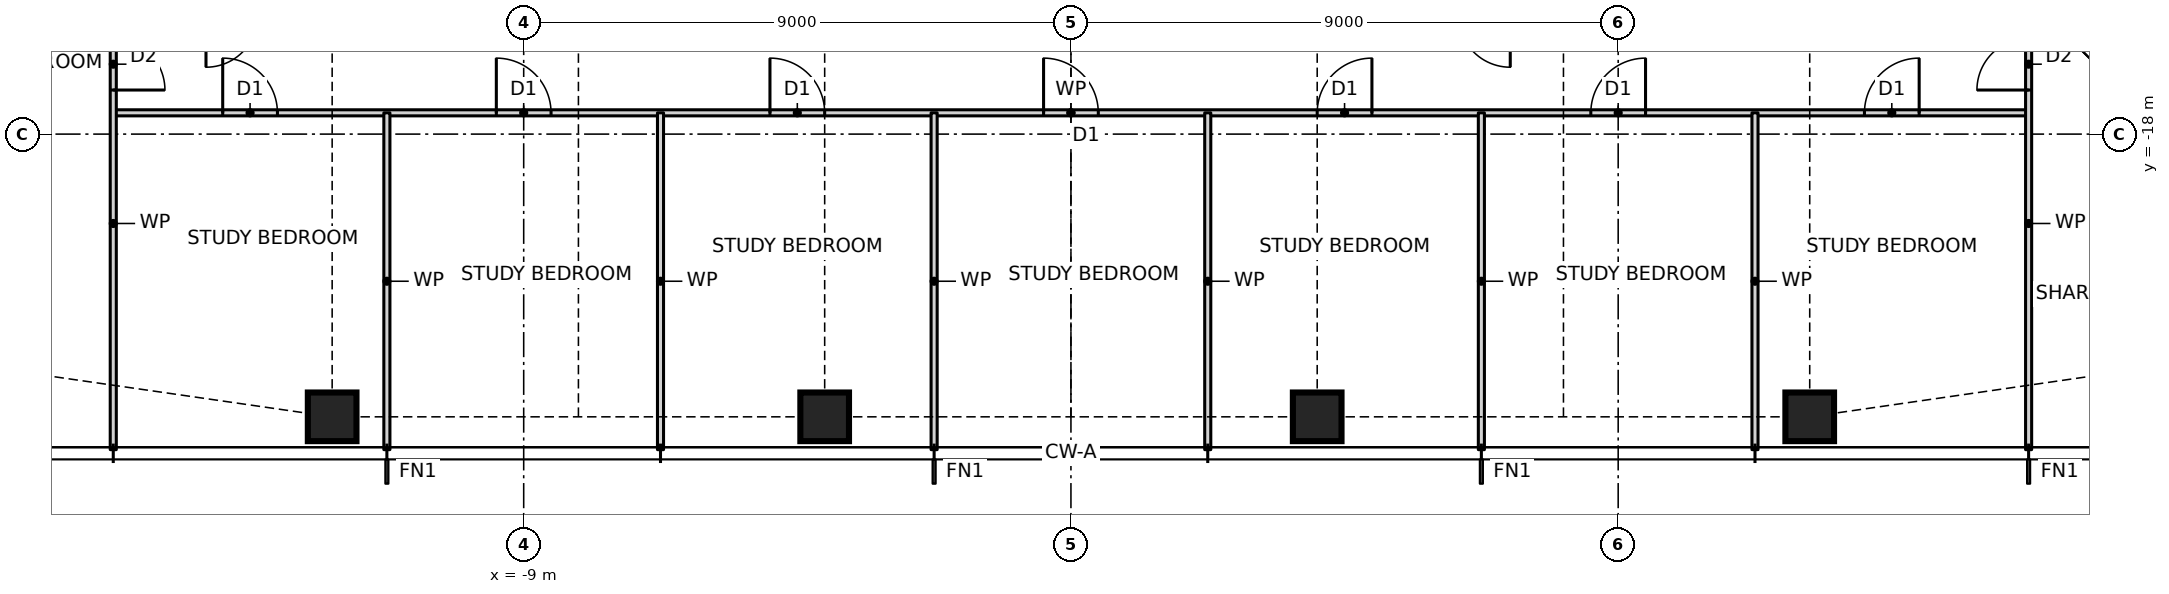
"""IFC4 building model, lengths in metres.
Left out: names, types, materials, properties, quantities, classifications, styles, units other than length and angle.
Written with IfcOpenShell. Run it as: python <this file> out.ifc"""

import sys

from ifc_helpers import new_model, si_unit, direction, frame, frame_2d, origin, origin_2d, place, context, subcontext, project, spatial, rectangle, hollow_rectangle, extrude, element, fill, save


model = new_model("IFC4")
c1 = context("Model", 3, precision=1e-05, world=origin(), true_north=direction((0.0, 1.0)))
c2 = subcontext(c1, "Body", "Model", "MODEL_VIEW")
j1 = project(units=[si_unit("LENGTHUNIT", "METRE"), si_unit("PLANEANGLEUNIT", "RADIAN")], contexts=[c1])
p1 = place(None, origin())
s1 = spatial("IfcSite", under=j1, at=p1, CompositionType="ELEMENT")
p2 = place(p1, origin())
s2 = spatial("IfcBuilding", under=s1, at=p2, CompositionType="ELEMENT")
p3 = place(p2, frame((0.0, 0.0, 18.5)))
s3 = spatial("IfcBuildingStorey", under=s2, at=p3, CompositionType="ELEMENT", Elevation=18.5)
for number, where, z_axis, x_axis in (
    (1, (-12.15, -22.65, 0.0), (0.0, 0.0, 1.0), (1.0, 0.0, 0.0)),
    (2, (-4.05, -22.65, 0.0), (0.0, 0.0, 1.0), (1.0, 0.0, 0.0)),
    (3, (4.05, -22.65, 0.0), (0.0, 0.0, 1.0), (1.0, 0.0, 0.0)),
    (4, (12.15, -22.65, 0.0), (0.0, 0.0, 1.0), (1.0, 0.0, 0.0)),
):
    element("IfcColumn", number, at=place(p3, frame(where, z_axis=z_axis, x_axis=x_axis)), inside=s3, PredefinedType="COLUMN", context=c2, shape_type="SweptSolid", body=[
        extrude(hollow_rectangle(XDim=0.8, YDim=0.8, WallThickness=0.09, at=origin_2d()), origin(), (0.0, 0.0, 1.0), 3.5),
    ])
p4 = place(p3, frame((-15.75, -17.65, 0.0), z_axis=(0.0, 0.0, 1.0), x_axis=(1.0, 0.0, 0.0)))
e5 = element("IfcWall", 5, at=p4, inside=s3, PredefinedType="PARTITIONING", context=c2, shape_type="SweptSolid", body=[
    extrude(rectangle(XDim=31.5, YDim=0.1, at=frame_2d((15.75, 0.0))), origin(), (0.0, 0.0, 1.0), 3.27),
])
p5 = place(p4, frame((1.8, 0.0, 0.0)))
e6 = element("IfcOpeningElement", 6, at=p5, cuts=e5, PredefinedType="OPENING", context=c2, shape_type="SweptSolid", body=[
    extrude(rectangle(XDim=0.9, YDim=2.1, at=frame_2d((0.45, 1.05))), frame((0.0, 0.06, 0.0), z_axis=(0.0, -1.0, 0.0), x_axis=(1.0, 0.0, 0.0)), (0.0, 0.0, 1.0), 0.12),
])
p6 = place(p4, frame((6.3, 0.0, 0.0)))
e7 = element("IfcOpeningElement", 7, at=p6, cuts=e5, PredefinedType="OPENING", context=c2, shape_type="SweptSolid", body=[
    extrude(rectangle(XDim=0.9, YDim=2.1, at=frame_2d((0.45, 1.05))), frame((0.0, 0.06, 0.0), z_axis=(0.0, -1.0, 0.0), x_axis=(1.0, 0.0, 0.0)), (0.0, 0.0, 1.0), 0.12),
])
p7 = place(p4, frame((10.8, 0.0, 0.0)))
e8 = element("IfcOpeningElement", 8, at=p7, cuts=e5, PredefinedType="OPENING", context=c2, shape_type="SweptSolid", body=[
    extrude(rectangle(XDim=0.9, YDim=2.1, at=frame_2d((0.45, 1.05))), frame((0.0, 0.06, 0.0), z_axis=(0.0, -1.0, 0.0), x_axis=(1.0, 0.0, 0.0)), (0.0, 0.0, 1.0), 0.12),
])
p8 = place(p4, frame((15.3, 0.0, 0.0)))
e9 = element("IfcOpeningElement", 9, at=p8, cuts=e5, PredefinedType="OPENING", context=c2, shape_type="SweptSolid", body=[
    extrude(rectangle(XDim=0.9, YDim=2.1, at=frame_2d((0.45, 1.05))), frame((0.0, 0.06, 0.0), z_axis=(0.0, -1.0, 0.0), x_axis=(1.0, 0.0, 0.0)), (0.0, 0.0, 1.0), 0.12),
])
p9 = place(p4, frame((19.8, 0.0, 0.0)))
e10 = element("IfcOpeningElement", 10, at=p9, cuts=e5, PredefinedType="OPENING", context=c2, shape_type="SweptSolid", body=[
    extrude(rectangle(XDim=0.9, YDim=2.1, at=frame_2d((0.45, 1.05))), frame((0.0, 0.06, 0.0), z_axis=(0.0, -1.0, 0.0), x_axis=(1.0, 0.0, 0.0)), (0.0, 0.0, 1.0), 0.12),
])
p10 = place(p4, frame((24.3, 0.0, 0.0)))
e11 = element("IfcOpeningElement", 11, at=p10, cuts=e5, PredefinedType="OPENING", context=c2, shape_type="SweptSolid", body=[
    extrude(rectangle(XDim=0.9, YDim=2.1, at=frame_2d((0.45, 1.05))), frame((0.0, 0.06, 0.0), z_axis=(0.0, -1.0, 0.0), x_axis=(1.0, 0.0, 0.0)), (0.0, 0.0, 1.0), 0.12),
])
p11 = place(p4, frame((28.8, 0.0, 0.0)))
e12 = element("IfcOpeningElement", 12, at=p11, cuts=e5, PredefinedType="OPENING", context=c2, shape_type="SweptSolid", body=[
    extrude(rectangle(XDim=0.9, YDim=2.1, at=frame_2d((0.45, 1.05))), frame((0.0, 0.06, 0.0), z_axis=(0.0, -1.0, 0.0), x_axis=(1.0, 0.0, 0.0)), (0.0, 0.0, 1.0), 0.12),
])
p12 = place(p3, frame((15.75, -23.19, 0.0), z_axis=(0.0, 0.0, 1.0), x_axis=(0.0, 1.0, 0.0)))
e13 = element("IfcWall", 13, at=p12, inside=s3, PredefinedType="PARTITIONING", context=c2, shape_type="SweptSolid", body=[
    extrude(rectangle(XDim=7.44, YDim=0.1, at=frame_2d((3.72, 0.0))), origin(), (0.0, 0.0, 1.0), 3.27),
])
p13 = place(p12, frame((5.915, 0.0, 0.0)))
e14 = element("IfcOpeningElement", 14, at=p13, cuts=e13, PredefinedType="OPENING", context=c2, shape_type="SweptSolid", body=[
    extrude(rectangle(XDim=0.85, YDim=2.1, at=frame_2d((0.425, 1.05))), frame((0.0, 0.06, 0.0), z_axis=(0.0, -1.0, 0.0), x_axis=(1.0, 0.0, 0.0)), (0.0, 0.0, 1.0), 0.12),
])
for number, where, z_axis, x_axis in (
    (15, (11.25, -23.19, 0.0), (0.0, 0.0, 1.0), (0.0, 1.0, 0.0)),
    (16, (6.75, -23.19, 0.0), (0.0, 0.0, 1.0), (0.0, 1.0, 0.0)),
    (17, (2.25, -23.19, 0.0), (0.0, 0.0, 1.0), (0.0, 1.0, 0.0)),
    (18, (-2.25, -23.19, 0.0), (0.0, 0.0, 1.0), (0.0, 1.0, 0.0)),
    (19, (-6.75, -23.19, 0.0), (0.0, 0.0, 1.0), (0.0, 1.0, 0.0)),
    (20, (-11.25, -23.19, 0.0), (0.0, 0.0, 1.0), (0.0, 1.0, 0.0)),
):
    element("IfcWall", number, at=place(p3, frame(where, z_axis=z_axis, x_axis=x_axis)), inside=s3, PredefinedType="PARTITIONING", context=c2, shape_type="SweptSolid", body=[
        extrude(rectangle(XDim=5.54, YDim=0.1, at=frame_2d((2.77, 0.0))), origin(), (0.0, 0.0, 1.0), 3.27),
    ])
p14 = place(p3, frame((-15.75, -23.19, 0.0), z_axis=(0.0, 0.0, 1.0), x_axis=(0.0, 1.0, 0.0)))
e21 = element("IfcWall", 21, at=p14, inside=s3, PredefinedType="PARTITIONING", context=c2, shape_type="SweptSolid", body=[
    extrude(rectangle(XDim=7.44, YDim=0.1, at=frame_2d((3.72, 0.0))), origin(), (0.0, 0.0, 1.0), 3.27),
])
p15 = place(p14, frame((5.915, 0.0, 0.0)))
e22 = element("IfcOpeningElement", 22, at=p15, cuts=e21, PredefinedType="OPENING", context=c2, shape_type="SweptSolid", body=[
    extrude(rectangle(XDim=0.85, YDim=2.1, at=frame_2d((0.425, 1.05))), frame((0.0, 0.06, 0.0), z_axis=(0.0, -1.0, 0.0), x_axis=(1.0, 0.0, 0.0)), (0.0, 0.0, 1.0), 0.12),
])
p16 = place(p5, origin())
e23 = element("IfcDoor", 23, at=p16, inside=s3, OperationType="SINGLE_SWING_LEFT", PredefinedType="DOOR", context=c2, shape_type="SweptSolid", body=[
    extrude(rectangle(XDim=0.9, YDim=2.1, at=frame_2d((0.45, 1.05))), frame((0.0, 0.025, 0.0), z_axis=(0.0, -1.0, 0.0), x_axis=(1.0, 0.0, 0.0)), (0.0, 0.0, 1.0), 0.05),
])
fill(e6, e23)
p17 = place(p6, origin())
e24 = element("IfcDoor", 24, at=p17, inside=s3, OperationType="SINGLE_SWING_LEFT", PredefinedType="DOOR", context=c2, shape_type="SweptSolid", body=[
    extrude(rectangle(XDim=0.9, YDim=2.1, at=frame_2d((0.45, 1.05))), frame((0.0, 0.025, 0.0), z_axis=(0.0, -1.0, 0.0), x_axis=(1.0, 0.0, 0.0)), (0.0, 0.0, 1.0), 0.05),
])
fill(e7, e24)
p18 = place(p7, origin())
e25 = element("IfcDoor", 25, at=p18, inside=s3, OperationType="SINGLE_SWING_LEFT", PredefinedType="DOOR", context=c2, shape_type="SweptSolid", body=[
    extrude(rectangle(XDim=0.9, YDim=2.1, at=frame_2d((0.45, 1.05))), frame((0.0, 0.025, 0.0), z_axis=(0.0, -1.0, 0.0), x_axis=(1.0, 0.0, 0.0)), (0.0, 0.0, 1.0), 0.05),
])
fill(e8, e25)
p19 = place(p8, origin())
e26 = element("IfcDoor", 26, at=p19, inside=s3, OperationType="SINGLE_SWING_LEFT", PredefinedType="DOOR", context=c2, shape_type="SweptSolid", body=[
    extrude(rectangle(XDim=0.9, YDim=2.1, at=frame_2d((0.45, 1.05))), frame((0.0, 0.025, 0.0), z_axis=(0.0, -1.0, 0.0), x_axis=(1.0, 0.0, 0.0)), (0.0, 0.0, 1.0), 0.05),
])
fill(e9, e26)
p20 = place(p9, origin())
e27 = element("IfcDoor", 27, at=p20, inside=s3, OperationType="SINGLE_SWING_RIGHT", PredefinedType="DOOR", context=c2, shape_type="SweptSolid", body=[
    extrude(rectangle(XDim=0.9, YDim=2.1, at=frame_2d((0.45, 1.05))), frame((0.0, 0.025, 0.0), z_axis=(0.0, -1.0, 0.0), x_axis=(1.0, 0.0, 0.0)), (0.0, 0.0, 1.0), 0.05),
])
fill(e10, e27)
p21 = place(p10, origin())
e28 = element("IfcDoor", 28, at=p21, inside=s3, OperationType="SINGLE_SWING_RIGHT", PredefinedType="DOOR", context=c2, shape_type="SweptSolid", body=[
    extrude(rectangle(XDim=0.9, YDim=2.1, at=frame_2d((0.45, 1.05))), frame((0.0, 0.025, 0.0), z_axis=(0.0, -1.0, 0.0), x_axis=(1.0, 0.0, 0.0)), (0.0, 0.0, 1.0), 0.05),
])
fill(e11, e28)
p22 = place(p11, origin())
e29 = element("IfcDoor", 29, at=p22, inside=s3, OperationType="SINGLE_SWING_RIGHT", PredefinedType="DOOR", context=c2, shape_type="SweptSolid", body=[
    extrude(rectangle(XDim=0.9, YDim=2.1, at=frame_2d((0.45, 1.05))), frame((0.0, 0.025, 0.0), z_axis=(0.0, -1.0, 0.0), x_axis=(1.0, 0.0, 0.0)), (0.0, 0.0, 1.0), 0.05),
])
fill(e12, e29)
p23 = place(p15, frame((0.85, 0.0, 0.0), z_axis=(0.0, 0.0, 1.0), x_axis=(-1.0, 0.0, 0.0)))
e30 = element("IfcDoor", 30, at=p23, inside=s3, OperationType="SINGLE_SWING_RIGHT", PredefinedType="DOOR", context=c2, shape_type="SweptSolid", body=[
    extrude(rectangle(XDim=0.85, YDim=2.1, at=frame_2d((0.425, 1.05))), frame((0.0, 0.025, 0.0), z_axis=(0.0, -1.0, 0.0), x_axis=(1.0, 0.0, 0.0)), (0.0, 0.0, 1.0), 0.05),
])
fill(e22, e30)
p24 = place(p13, origin())
e31 = element("IfcDoor", 31, at=p24, inside=s3, OperationType="SINGLE_SWING_LEFT", PredefinedType="DOOR", context=c2, shape_type="SweptSolid", body=[
    extrude(rectangle(XDim=0.85, YDim=2.1, at=frame_2d((0.425, 1.05))), frame((0.0, 0.025, 0.0), z_axis=(0.0, -1.0, 0.0), x_axis=(1.0, 0.0, 0.0)), (0.0, 0.0, 1.0), 0.05),
])
fill(e14, e31)
save(model, sys.argv[1])
